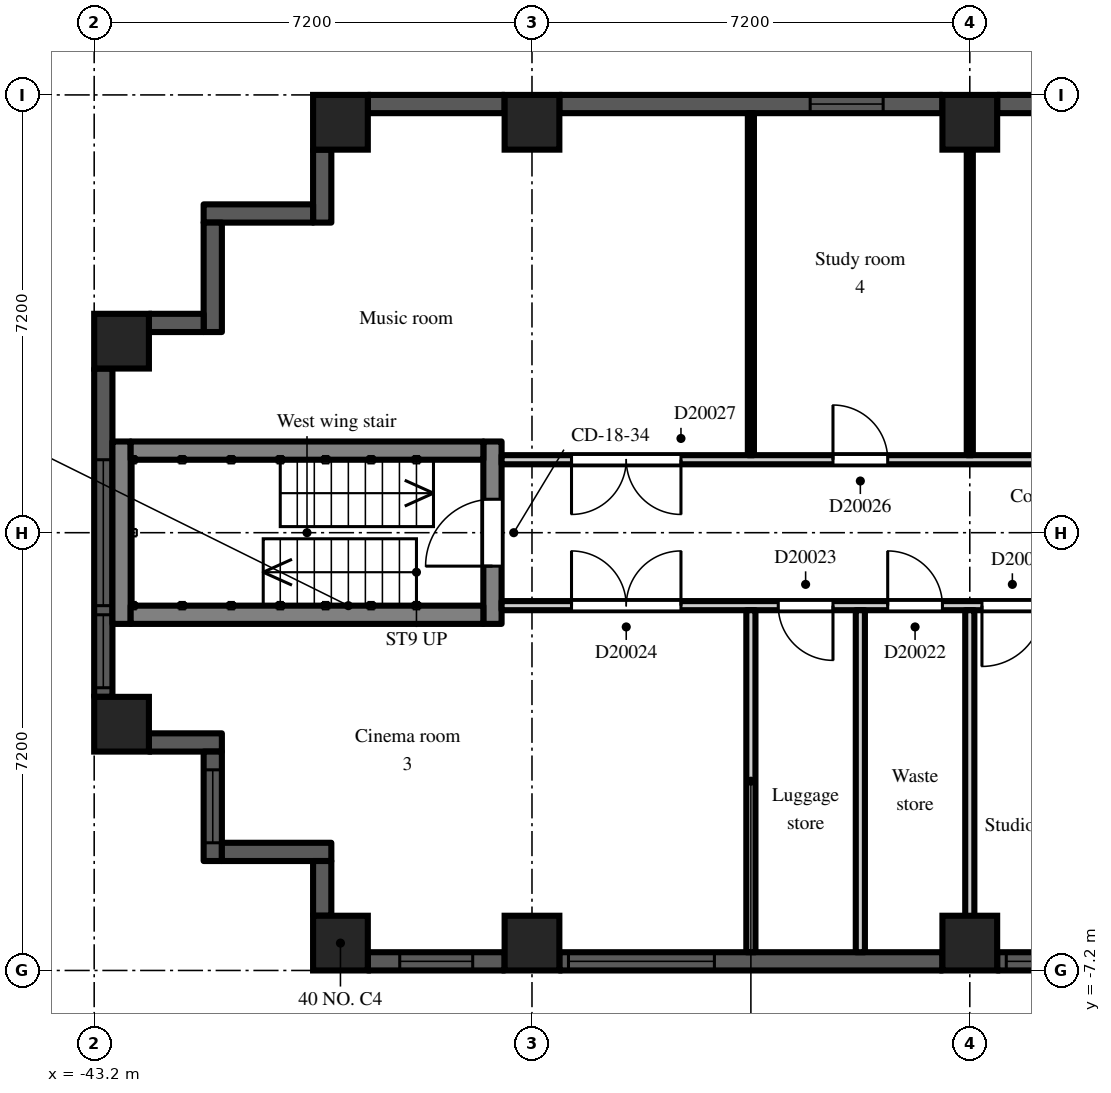
"""IFC4 building model, lengths in metres.
Left out: names, types, materials, properties, quantities, classifications, styles, units other than length and angle.
Written with IfcOpenShell. Run it as: python <this file> out.ifc"""

import sys

from ifc_helpers import new_model, si_unit, direction, frame, frame_2d, origin, origin_2d, place, context, subcontext, project, spatial, rectangle, extrude, element, fill, save


model = new_model("IFC4")
c1 = context("Model", 3, precision=1e-05, world=origin(), true_north=direction((0.0, 1.0)))
c2 = subcontext(c1, "Body", "Model", "MODEL_VIEW")
j1 = project(units=[si_unit("LENGTHUNIT", "METRE"), si_unit("PLANEANGLEUNIT", "RADIAN")], contexts=[c1])
p1 = place(None, origin())
s1 = spatial("IfcSite", under=j1, at=p1, CompositionType="ELEMENT")
p2 = place(p1, origin())
s2 = spatial("IfcBuilding", under=s1, at=p2, CompositionType="ELEMENT")
p3 = place(p2, frame((0.0, 0.0, 138.3)))
s3 = spatial("IfcBuildingStorey", under=s2, at=p3, CompositionType="ELEMENT", Elevation=138.3)
for number, where, z_axis, x_axis in (
    (1, (-42.75, -3.15, 0.0), (0.0, 0.0, 1.0), (1.0, 0.0, 0.0)),
    (2, (-42.75, 3.15, 0.0), (0.0, 0.0, 1.0), (1.0, 0.0, 0.0)),
    (3, (-39.15, -6.75, 0.0), (0.0, 0.0, 1.0), (1.0, 0.0, 0.0)),
    (4, (-39.15, 6.75, 0.0), (0.0, 0.0, 1.0), (1.0, 0.0, 0.0)),
    (5, (-36.0, -6.75, 0.0), (0.0, 0.0, 1.0), (1.0, 0.0, 0.0)),
    (6, (-36.0, 6.75, 0.0), (0.0, 0.0, 1.0), (1.0, 0.0, 0.0)),
    (7, (-28.8, -6.75, 0.0), (0.0, 0.0, 1.0), (1.0, 0.0, 0.0)),
    (8, (-28.8, 6.75, 0.0), (0.0, 0.0, 1.0), (1.0, 0.0, 0.0)),
):
    element("IfcColumn", number, at=place(p3, frame(where, z_axis=z_axis, x_axis=x_axis)), inside=s3, PredefinedType="COLUMN", context=c2, shape_type="SweptSolid", body=[
        extrude(rectangle(XDim=0.9, YDim=0.9, at=origin_2d()), origin(), (0.0, 0.0, 1.0), 3.0),
    ])
p4 = place(p3, frame((-25.2, 7.05, 0.0), z_axis=(0.0, 0.0, 1.0), x_axis=(-1.0, 0.0, 0.0)))
e9 = element("IfcWall", 9, at=p4, inside=s3, PredefinedType="SOLIDWALL", context=c2, shape_type="SweptSolid", body=[
    extrude(rectangle(XDim=3.15, YDim=0.3, at=frame_2d((1.575, 0.0))), origin(), (0.0, 0.0, 1.0), 2.2),
])
p5 = place(p4, frame((0.975, 0.0, 0.2)))
e10 = element("IfcOpeningElement", 10, at=p5, cuts=e9, PredefinedType="OPENING", context=c2, shape_type="SweptSolid", body=[
    extrude(rectangle(XDim=1.2, YDim=1.85, at=frame_2d((0.6, 0.925))), frame((0.0, 0.16, 0.0), z_axis=(0.0, -1.0, 0.0), x_axis=(1.0, 0.0, 0.0)), (0.0, 0.0, 1.0), 0.32),
])
p6 = place(p3, frame((-29.25, 7.05, 0.0), z_axis=(0.0, 0.0, 1.0), x_axis=(-1.0, 0.0, 0.0)))
e11 = element("IfcWall", 11, at=p6, inside=s3, PredefinedType="SOLIDWALL", context=c2, shape_type="SweptSolid", body=[
    extrude(rectangle(XDim=6.3, YDim=0.3, at=frame_2d((3.15, 0.0))), origin(), (0.0, 0.0, 1.0), 2.2),
])
p7 = place(p6, frame((0.975, 0.0, 0.2)))
e12 = element("IfcOpeningElement", 12, at=p7, cuts=e11, PredefinedType="OPENING", context=c2, shape_type="SweptSolid", body=[
    extrude(rectangle(XDim=1.2, YDim=1.85, at=frame_2d((0.6, 0.925))), frame((0.0, 0.16, 0.0), z_axis=(0.0, -1.0, 0.0), x_axis=(1.0, 0.0, 0.0)), (0.0, 0.0, 1.0), 0.32),
])
p8 = place(p3, frame((-36.45, 7.05, 0.0), z_axis=(0.0, 0.0, 1.0), x_axis=(-1.0, 0.0, 0.0)))
e13 = element("IfcWall", 13, at=p8, inside=s3, PredefinedType="SOLIDWALL", context=c2, shape_type="SweptSolid", body=[
    extrude(rectangle(XDim=2.25, YDim=0.3, at=frame_2d((1.125, 0.0))), origin(), (0.0, 0.0, 1.0), 2.2),
])
p9 = place(p3, frame((-39.45, 6.3, 0.0), z_axis=(0.0, 0.0, 1.0), x_axis=(0.0, -1.0, 0.0)))
e14 = element("IfcWall", 14, at=p9, inside=s3, PredefinedType="SOLIDWALL", context=c2, shape_type="SweptSolid", body=[
    extrude(rectangle(XDim=1.2, YDim=0.3, at=frame_2d((0.6, 0.0))), origin(), (0.0, 0.0, 1.0), 2.6),
])
p10 = place(p3, frame((-39.6, 5.25, 0.0), z_axis=(0.0, 0.0, 1.0), x_axis=(-1.0, 0.0, 0.0)))
e15 = element("IfcWall", 15, at=p10, inside=s3, PredefinedType="SOLIDWALL", context=c2, shape_type="SweptSolid", body=[
    extrude(rectangle(XDim=1.8, YDim=0.3, at=frame_2d((0.9, 0.0))), origin(), (0.0, 0.0, 1.0), 2.6),
])
p11 = place(p3, frame((-41.25, 5.1, 0.0), z_axis=(0.0, 0.0, 1.0), x_axis=(0.0, -1.0, 0.0)))
e16 = element("IfcWall", 16, at=p11, inside=s3, PredefinedType="SOLIDWALL", context=c2, shape_type="SweptSolid", body=[
    extrude(rectangle(XDim=1.8, YDim=0.3, at=frame_2d((0.9, 0.0))), origin(), (0.0, 0.0, 1.0), 2.6),
])
p12 = place(p3, frame((-41.4, 3.45, 0.0), z_axis=(0.0, 0.0, 1.0), x_axis=(-1.0, 0.0, 0.0)))
e17 = element("IfcWall", 17, at=p12, inside=s3, PredefinedType="SOLIDWALL", context=c2, shape_type="SweptSolid", body=[
    extrude(rectangle(XDim=0.9, YDim=0.3, at=frame_2d((0.45, 0.0))), origin(), (0.0, 0.0, 1.0), 2.6),
])
p13 = place(p3, frame((-43.05, 2.7, 0.0), z_axis=(0.0, 0.0, 1.0), x_axis=(0.0, -1.0, 0.0)))
e18 = element("IfcWall", 18, at=p13, inside=s3, PredefinedType="SOLIDWALL", context=c2, shape_type="SweptSolid", body=[
    extrude(rectangle(XDim=5.4, YDim=0.3, at=frame_2d((2.7, 0.0))), origin(), (0.0, 0.0, 1.0), 2.2),
])
p14 = place(p13, frame((1.5, 0.0, 0.2)))
e19 = element("IfcOpeningElement", 19, at=p14, cuts=e18, PredefinedType="OPENING", context=c2, shape_type="SweptSolid", body=[
    extrude(rectangle(XDim=2.4, YDim=1.85, at=frame_2d((1.2, 0.925))), frame((0.0, 0.16, 0.0), z_axis=(0.0, -1.0, 0.0), x_axis=(1.0, 0.0, 0.0)), (0.0, 0.0, 1.0), 0.32),
])
p15 = place(p13, frame((4.05, 0.0, 0.2)))
e20 = element("IfcOpeningElement", 20, at=p15, cuts=e18, PredefinedType="OPENING", context=c2, shape_type="SweptSolid", body=[
    extrude(rectangle(XDim=1.2, YDim=1.85, at=frame_2d((0.6, 0.925))), frame((0.0, 0.16, 0.0), z_axis=(0.0, -1.0, 0.0), x_axis=(1.0, 0.0, 0.0)), (0.0, 0.0, 1.0), 0.32),
])
p16 = place(p3, frame((-42.3, -3.45, 0.0), z_axis=(0.0, 0.0, 1.0), x_axis=(1.0, 0.0, 0.0)))
e21 = element("IfcWall", 21, at=p16, inside=s3, PredefinedType="SOLIDWALL", context=c2, shape_type="SweptSolid", body=[
    extrude(rectangle(XDim=1.2, YDim=0.3, at=frame_2d((0.6, 0.0))), origin(), (0.0, 0.0, 1.0), 2.6),
])
p17 = place(p3, frame((-41.25, -3.6, 0.0), z_axis=(0.0, 0.0, 1.0), x_axis=(0.0, -1.0, 0.0)))
e22 = element("IfcWall", 22, at=p17, inside=s3, PredefinedType="SOLIDWALL", context=c2, shape_type="SweptSolid", body=[
    extrude(rectangle(XDim=1.8, YDim=0.3, at=frame_2d((0.9, 0.0))), origin(), (0.0, 0.0, 1.0), 2.6),
])
p18 = place(p17, frame((0.3, 0.0, 0.2)))
e23 = element("IfcOpeningElement", 23, at=p18, cuts=e22, PredefinedType="OPENING", context=c2, shape_type="SweptSolid", body=[
    extrude(rectangle(XDim=1.2, YDim=1.85, at=frame_2d((0.6, 0.925))), frame((0.0, 0.16, 0.0), z_axis=(0.0, -1.0, 0.0), x_axis=(1.0, 0.0, 0.0)), (0.0, 0.0, 1.0), 0.32),
])
p19 = place(p3, frame((-41.1, -5.25, 0.0), z_axis=(0.0, 0.0, 1.0), x_axis=(1.0, 0.0, 0.0)))
e24 = element("IfcWall", 24, at=p19, inside=s3, PredefinedType="SOLIDWALL", context=c2, shape_type="SweptSolid", body=[
    extrude(rectangle(XDim=1.8, YDim=0.3, at=frame_2d((0.9, 0.0))), origin(), (0.0, 0.0, 1.0), 2.6),
])
p20 = place(p3, frame((-39.45, -5.4, 0.0), z_axis=(0.0, 0.0, 1.0), x_axis=(0.0, -1.0, 0.0)))
e25 = element("IfcWall", 25, at=p20, inside=s3, PredefinedType="SOLIDWALL", context=c2, shape_type="SweptSolid", body=[
    extrude(rectangle(XDim=0.9, YDim=0.3, at=frame_2d((0.45, 0.0))), origin(), (0.0, 0.0, 1.0), 2.6),
])
p21 = place(p3, frame((-38.7, -7.05, 0.0), z_axis=(0.0, 0.0, 1.0), x_axis=(1.0, 0.0, 0.0)))
e26 = element("IfcWall", 26, at=p21, inside=s3, PredefinedType="SOLIDWALL", context=c2, shape_type="SweptSolid", body=[
    extrude(rectangle(XDim=2.25, YDim=0.3, at=frame_2d((1.125, 0.0))), origin(), (0.0, 0.0, 1.0), 2.2),
])
p22 = place(p21, frame((0.525, 0.0, 0.2)))
e27 = element("IfcOpeningElement", 27, at=p22, cuts=e26, PredefinedType="OPENING", context=c2, shape_type="SweptSolid", body=[
    extrude(rectangle(XDim=1.2, YDim=1.85, at=frame_2d((0.6, 0.925))), frame((0.0, 0.16, 0.0), z_axis=(0.0, -1.0, 0.0), x_axis=(1.0, 0.0, 0.0)), (0.0, 0.0, 1.0), 0.32),
])
p23 = place(p3, frame((-35.55, -7.05, 0.0), z_axis=(0.0, 0.0, 1.0), x_axis=(1.0, 0.0, 0.0)))
e28 = element("IfcWall", 28, at=p23, inside=s3, PredefinedType="SOLIDWALL", context=c2, shape_type="SweptSolid", body=[
    extrude(rectangle(XDim=6.3, YDim=0.3, at=frame_2d((3.15, 0.0))), origin(), (0.0, 0.0, 1.0), 2.2),
])
p24 = place(p23, frame((0.15, 0.0, 0.2)))
e29 = element("IfcOpeningElement", 29, at=p24, cuts=e28, PredefinedType="OPENING", context=c2, shape_type="SweptSolid", body=[
    extrude(rectangle(XDim=2.4, YDim=1.85, at=frame_2d((1.2, 0.925))), frame((0.0, 0.16, 0.0), z_axis=(0.0, -1.0, 0.0), x_axis=(1.0, 0.0, 0.0)), (0.0, 0.0, 1.0), 0.32),
])
p25 = place(p3, frame((-28.35, -7.05, 0.0), z_axis=(0.0, 0.0, 1.0), x_axis=(1.0, 0.0, 0.0)))
e30 = element("IfcWall", 30, at=p25, inside=s3, PredefinedType="SOLIDWALL", context=c2, shape_type="SweptSolid", body=[
    extrude(rectangle(XDim=3.15, YDim=0.3, at=frame_2d((1.575, 0.0))), origin(), (0.0, 0.0, 1.0), 2.2),
])
p26 = place(p25, frame((0.15, 0.0, 0.2)))
e31 = element("IfcOpeningElement", 31, at=p26, cuts=e30, PredefinedType="OPENING", context=c2, shape_type="SweptSolid", body=[
    extrude(rectangle(XDim=2.4, YDim=1.85, at=frame_2d((1.2, 0.925))), frame((0.0, 0.16, 0.0), z_axis=(0.0, -1.0, 0.0), x_axis=(1.0, 0.0, 0.0)), (0.0, 0.0, 1.0), 0.32),
])
p27 = place(p3, frame((-36.65, -1.5, 0.0), z_axis=(0.0, 0.0, 1.0), x_axis=(0.0, 1.0, 0.0)))
e32 = element("IfcWall", 32, at=p27, inside=s3, PredefinedType="SHEAR", context=c2, shape_type="SweptSolid", body=[
    extrude(rectangle(XDim=3.0, YDim=0.3, at=frame_2d((1.5, 0.0))), origin(), (0.0, 0.0, 1.0), 2.6),
])
p28 = place(p27, frame((0.95, 0.0, 0.0)))
e33 = element("IfcOpeningElement", 33, at=p28, cuts=e32, PredefinedType="OPENING", context=c2, shape_type="SweptSolid", body=[
    extrude(rectangle(XDim=1.1, YDim=2.1, at=frame_2d((0.55, 1.05))), frame((0.0, 0.16, 0.0), z_axis=(0.0, -1.0, 0.0), x_axis=(1.0, 0.0, 0.0)), (0.0, 0.0, 1.0), 0.32),
])
p29 = place(p3, frame((-42.75, -1.5, 0.0), z_axis=(0.0, 0.0, 1.0), x_axis=(0.0, 1.0, 0.0)))
e34 = element("IfcWall", 34, at=p29, inside=s3, PredefinedType="SHEAR", context=c2, shape_type="SweptSolid", body=[
    extrude(rectangle(XDim=3.0, YDim=0.3, at=frame_2d((1.5, 0.0))), origin(), (0.0, 0.0, 1.0), 2.6),
])
for number, where, z_axis, x_axis in (
    (35, (-36.8, -1.35, 0.0), (0.0, 0.0, 1.0), (-1.0, 0.0, 0.0)),
    (36, (-36.8, 1.35, 0.0), (0.0, 0.0, 1.0), (-1.0, 0.0, 0.0)),
):
    element("IfcWall", number, at=place(p3, frame(where, z_axis=z_axis, x_axis=x_axis)), inside=s3, PredefinedType="SHEAR", context=c2, shape_type="SweptSolid", body=[
        extrude(rectangle(XDim=5.8, YDim=0.3, at=frame_2d((2.9, 0.0))), origin(), (0.0, 0.0, 1.0), 2.6),
    ])
p30 = place(p3, frame((-36.5, -1.2, 0.0), z_axis=(0.0, 0.0, 1.0), x_axis=(1.0, 0.0, 0.0)))
e37 = element("IfcWall", 37, at=p30, inside=s3, PredefinedType="PARTITIONING", context=c2, shape_type="SweptSolid", body=[
    extrude(rectangle(XDim=14.9, YDim=0.15, at=frame_2d((7.45, 0.0))), origin(), (0.0, 0.0, 1.0), 2.6),
])
p31 = place(p30, frame((7.9, 0.0, 0.0)))
e38 = element("IfcOpeningElement", 38, at=p31, cuts=e37, PredefinedType="OPENING", context=c2, shape_type="SweptSolid", body=[
    extrude(rectangle(XDim=1.0, YDim=2.1, at=frame_2d((0.5, 1.05))), frame((0.0, 0.085, 0.0), z_axis=(0.0, -1.0, 0.0), x_axis=(1.0, 0.0, 0.0)), (0.0, 0.0, 1.0), 0.17),
])
p32 = place(p30, frame((6.35, 0.0, 0.0)))
e39 = element("IfcOpeningElement", 39, at=p32, cuts=e37, PredefinedType="OPENING", context=c2, shape_type="SweptSolid", body=[
    extrude(rectangle(XDim=0.9, YDim=2.1, at=frame_2d((0.45, 1.05))), frame((0.0, 0.085, 0.0), z_axis=(0.0, -1.0, 0.0), x_axis=(1.0, 0.0, 0.0)), (0.0, 0.0, 1.0), 0.17),
])
p33 = place(p30, frame((4.55, 0.0, 0.0)))
e40 = element("IfcOpeningElement", 40, at=p33, cuts=e37, PredefinedType="OPENING", context=c2, shape_type="SweptSolid", body=[
    extrude(rectangle(XDim=0.9, YDim=2.1, at=frame_2d((0.45, 1.05))), frame((0.0, 0.085, 0.0), z_axis=(0.0, -1.0, 0.0), x_axis=(1.0, 0.0, 0.0)), (0.0, 0.0, 1.0), 0.17),
])
p34 = place(p30, frame((1.15, 0.0, 0.0)))
e41 = element("IfcOpeningElement", 41, at=p34, cuts=e37, PredefinedType="OPENING", context=c2, shape_type="SweptSolid", body=[
    extrude(rectangle(XDim=1.8, YDim=2.1, at=frame_2d((0.9, 1.05))), frame((0.0, 0.085, 0.0), z_axis=(0.0, -1.0, 0.0), x_axis=(1.0, 0.0, 0.0)), (0.0, 0.0, 1.0), 0.17),
])
p35 = place(p3, frame((-36.5, 1.2, 0.0), z_axis=(0.0, 0.0, 1.0), x_axis=(1.0, 0.0, 0.0)))
e42 = element("IfcWall", 42, at=p35, inside=s3, PredefinedType="PARTITIONING", context=c2, shape_type="SweptSolid", body=[
    extrude(rectangle(XDim=14.9, YDim=0.15, at=frame_2d((7.45, 0.0))), origin(), (0.0, 0.0, 1.0), 2.6),
])
p36 = place(p35, frame((10.4, 0.0, 0.0)))
e43 = element("IfcOpeningElement", 43, at=p36, cuts=e42, PredefinedType="OPENING", context=c2, shape_type="SweptSolid", body=[
    extrude(rectangle(XDim=1.8, YDim=2.1, at=frame_2d((0.9, 1.05))), frame((0.0, 0.085, 0.0), z_axis=(0.0, -1.0, 0.0), x_axis=(1.0, 0.0, 0.0)), (0.0, 0.0, 1.0), 0.17),
])
p37 = place(p35, frame((5.45, 0.0, 0.0)))
e44 = element("IfcOpeningElement", 44, at=p37, cuts=e42, PredefinedType="OPENING", context=c2, shape_type="SweptSolid", body=[
    extrude(rectangle(XDim=0.9, YDim=2.1, at=frame_2d((0.45, 1.05))), frame((0.0, 0.085, 0.0), z_axis=(0.0, -1.0, 0.0), x_axis=(1.0, 0.0, 0.0)), (0.0, 0.0, 1.0), 0.17),
])
p38 = place(p35, frame((1.15, 0.0, 0.0)))
e45 = element("IfcOpeningElement", 45, at=p38, cuts=e42, PredefinedType="OPENING", context=c2, shape_type="SweptSolid", body=[
    extrude(rectangle(XDim=1.8, YDim=2.1, at=frame_2d((0.9, 1.05))), frame((0.0, 0.085, 0.0), z_axis=(0.0, -1.0, 0.0), x_axis=(1.0, 0.0, 0.0)), (0.0, 0.0, 1.0), 0.17),
])
p39 = place(p3, frame((-32.4, -6.9, 0.0), z_axis=(0.0, 0.0, 1.0), x_axis=(0.0, 1.0, 0.0)))
e46 = element("IfcWall", 46, at=p39, inside=s3, PredefinedType="PARTITIONING", context=c2, shape_type="SweptSolid", body=[
    extrude(rectangle(XDim=5.625, YDim=0.15, at=frame_2d((2.812, 0.0))), origin(), (0.0, 0.0, 1.0), 2.6),
])
p40 = place(p3, frame((-32.4, 1.275, 0.0), z_axis=(0.0, 0.0, 1.0), x_axis=(0.0, 1.0, 0.0)))
e47 = element("IfcWall", 47, at=p40, inside=s3, PredefinedType="PARTITIONING", context=c2, shape_type="SweptSolid", body=[
    extrude(rectangle(XDim=5.625, YDim=0.1, at=frame_2d((2.812, 0.0))), origin(), (0.0, 0.0, 1.0), 2.6),
])
for number, where, z_axis, x_axis in (
    (48, (-30.6, -6.9, 0.0), (0.0, 0.0, 1.0), (0.0, 1.0, 0.0)),
    (49, (-28.8, -6.9, 0.0), (0.0, 0.0, 1.0), (0.0, 1.0, 0.0)),
):
    element("IfcWall", number, at=place(p3, frame(where, z_axis=z_axis, x_axis=x_axis)), inside=s3, PredefinedType="PARTITIONING", context=c2, shape_type="SweptSolid", body=[
        extrude(rectangle(XDim=5.625, YDim=0.15, at=frame_2d((2.812, 0.0))), origin(), (0.0, 0.0, 1.0), 2.6),
    ])
p41 = place(p3, frame((-28.8, 1.275, 0.0), z_axis=(0.0, 0.0, 1.0), x_axis=(0.0, 1.0, 0.0)))
e50 = element("IfcWall", 50, at=p41, inside=s3, PredefinedType="PARTITIONING", context=c2, shape_type="SweptSolid", body=[
    extrude(rectangle(XDim=5.625, YDim=0.1, at=frame_2d((2.812, 0.0))), origin(), (0.0, 0.0, 1.0), 2.6),
])
p42 = place(p7, origin())
e51 = element("IfcWindow", 51, at=p42, inside=s3, PartitioningType="SINGLE_PANEL", PredefinedType="WINDOW", context=c2, shape_type="SweptSolid", body=[
    extrude(rectangle(XDim=1.2, YDim=1.85, at=frame_2d((0.6, 0.925))), frame((0.0, 0.03, 0.0), z_axis=(0.0, -1.0, 0.0), x_axis=(1.0, 0.0, 0.0)), (0.0, 0.0, 1.0), 0.06),
])
fill(e12, e51)
p43 = place(p14, origin())
e52 = element("IfcWindow", 52, at=p43, inside=s3, PartitioningType="SINGLE_PANEL", PredefinedType="WINDOW", context=c2, shape_type="SweptSolid", body=[
    extrude(rectangle(XDim=2.4, YDim=1.85, at=frame_2d((1.2, 0.925))), frame((0.0, 0.03, 0.0), z_axis=(0.0, -1.0, 0.0), x_axis=(1.0, 0.0, 0.0)), (0.0, 0.0, 1.0), 0.06),
])
fill(e19, e52)
p44 = place(p15, origin())
e53 = element("IfcWindow", 53, at=p44, inside=s3, PartitioningType="SINGLE_PANEL", PredefinedType="WINDOW", context=c2, shape_type="SweptSolid", body=[
    extrude(rectangle(XDim=1.2, YDim=1.85, at=frame_2d((0.6, 0.925))), frame((0.0, 0.03, 0.0), z_axis=(0.0, -1.0, 0.0), x_axis=(1.0, 0.0, 0.0)), (0.0, 0.0, 1.0), 0.06),
])
fill(e20, e53)
p45 = place(p18, origin())
e54 = element("IfcWindow", 54, at=p45, inside=s3, PartitioningType="SINGLE_PANEL", PredefinedType="WINDOW", context=c2, shape_type="SweptSolid", body=[
    extrude(rectangle(XDim=1.2, YDim=1.85, at=frame_2d((0.6, 0.925))), frame((0.0, 0.03, 0.0), z_axis=(0.0, -1.0, 0.0), x_axis=(1.0, 0.0, 0.0)), (0.0, 0.0, 1.0), 0.06),
])
fill(e23, e54)
p46 = place(p22, origin())
e55 = element("IfcWindow", 55, at=p46, inside=s3, PartitioningType="SINGLE_PANEL", PredefinedType="WINDOW", context=c2, shape_type="SweptSolid", body=[
    extrude(rectangle(XDim=1.2, YDim=1.85, at=frame_2d((0.6, 0.925))), frame((0.0, 0.03, 0.0), z_axis=(0.0, -1.0, 0.0), x_axis=(1.0, 0.0, 0.0)), (0.0, 0.0, 1.0), 0.06),
])
fill(e27, e55)
p47 = place(p24, origin())
e56 = element("IfcWindow", 56, at=p47, inside=s3, PartitioningType="SINGLE_PANEL", PredefinedType="WINDOW", context=c2, shape_type="SweptSolid", body=[
    extrude(rectangle(XDim=2.4, YDim=1.85, at=frame_2d((1.2, 0.925))), frame((0.0, 0.03, 0.0), z_axis=(0.0, -1.0, 0.0), x_axis=(1.0, 0.0, 0.0)), (0.0, 0.0, 1.0), 0.06),
])
fill(e29, e56)
p48 = place(p26, origin())
e57 = element("IfcWindow", 57, at=p48, inside=s3, PartitioningType="SINGLE_PANEL", PredefinedType="WINDOW", context=c2, shape_type="SweptSolid", body=[
    extrude(rectangle(XDim=2.4, YDim=1.85, at=frame_2d((1.2, 0.925))), frame((0.0, 0.03, 0.0), z_axis=(0.0, -1.0, 0.0), x_axis=(1.0, 0.0, 0.0)), (0.0, 0.0, 1.0), 0.06),
])
fill(e31, e57)
p49 = place(p28, origin())
e58 = element("IfcDoor", 58, at=p49, inside=s3, OperationType="SINGLE_SWING_LEFT", PredefinedType="DOOR", context=c2, shape_type="SweptSolid", body=[
    extrude(rectangle(XDim=1.1, YDim=2.1, at=frame_2d((0.55, 1.05))), frame((0.0, 0.025, 0.0), z_axis=(0.0, -1.0, 0.0), x_axis=(1.0, 0.0, 0.0)), (0.0, 0.0, 1.0), 0.05),
])
fill(e33, e58)
p50 = place(p31, frame((1.0, 0.0, 0.0), z_axis=(0.0, 0.0, 1.0), x_axis=(-1.0, 0.0, 0.0)))
e59 = element("IfcDoor", 59, at=p50, inside=s3, OperationType="SINGLE_SWING_RIGHT", PredefinedType="DOOR", context=c2, shape_type="SweptSolid", body=[
    extrude(rectangle(XDim=1.0, YDim=2.1, at=frame_2d((0.5, 1.05))), frame((0.0, 0.025, 0.0), z_axis=(0.0, -1.0, 0.0), x_axis=(1.0, 0.0, 0.0)), (0.0, 0.0, 1.0), 0.05),
])
fill(e38, e59)
p51 = place(p32, origin())
e60 = element("IfcDoor", 60, at=p51, inside=s3, OperationType="SINGLE_SWING_LEFT", PredefinedType="DOOR", context=c2, shape_type="SweptSolid", body=[
    extrude(rectangle(XDim=0.9, YDim=2.1, at=frame_2d((0.45, 1.05))), frame((0.0, 0.025, 0.0), z_axis=(0.0, -1.0, 0.0), x_axis=(1.0, 0.0, 0.0)), (0.0, 0.0, 1.0), 0.05),
])
fill(e39, e60)
p52 = place(p33, frame((0.9, 0.0, 0.0), z_axis=(0.0, 0.0, 1.0), x_axis=(-1.0, 0.0, 0.0)))
e61 = element("IfcDoor", 61, at=p52, inside=s3, OperationType="SINGLE_SWING_LEFT", PredefinedType="DOOR", context=c2, shape_type="SweptSolid", body=[
    extrude(rectangle(XDim=0.9, YDim=2.1, at=frame_2d((0.45, 1.05))), frame((0.0, 0.025, 0.0), z_axis=(0.0, -1.0, 0.0), x_axis=(1.0, 0.0, 0.0)), (0.0, 0.0, 1.0), 0.05),
])
fill(e40, e61)
p53 = place(p34, origin())
e62 = element("IfcDoor", 62, at=p53, inside=s3, OperationType="DOUBLE_DOOR_DOUBLE_SWING", PredefinedType="DOOR", context=c2, shape_type="SweptSolid", body=[
    extrude(rectangle(XDim=1.8, YDim=2.1, at=frame_2d((0.9, 1.05))), frame((0.0, 0.025, 0.0), z_axis=(0.0, -1.0, 0.0), x_axis=(1.0, 0.0, 0.0)), (0.0, 0.0, 1.0), 0.05),
])
fill(e41, e62)
p54 = place(p37, origin())
e63 = element("IfcDoor", 63, at=p54, inside=s3, OperationType="SINGLE_SWING_LEFT", PredefinedType="DOOR", context=c2, shape_type="SweptSolid", body=[
    extrude(rectangle(XDim=0.9, YDim=2.1, at=frame_2d((0.45, 1.05))), frame((0.0, 0.025, 0.0), z_axis=(0.0, -1.0, 0.0), x_axis=(1.0, 0.0, 0.0)), (0.0, 0.0, 1.0), 0.05),
])
fill(e44, e63)
p55 = place(p38, frame((1.8, 0.0, 0.0), z_axis=(0.0, 0.0, 1.0), x_axis=(-1.0, 0.0, 0.0)))
e64 = element("IfcDoor", 64, at=p55, inside=s3, OperationType="DOUBLE_DOOR_DOUBLE_SWING", PredefinedType="DOOR", context=c2, shape_type="SweptSolid", body=[
    extrude(rectangle(XDim=1.8, YDim=2.1, at=frame_2d((0.9, 1.05))), frame((0.0, 0.025, 0.0), z_axis=(0.0, -1.0, 0.0), x_axis=(1.0, 0.0, 0.0)), (0.0, 0.0, 1.0), 0.05),
])
fill(e45, e64)
save(model, sys.argv[1])
